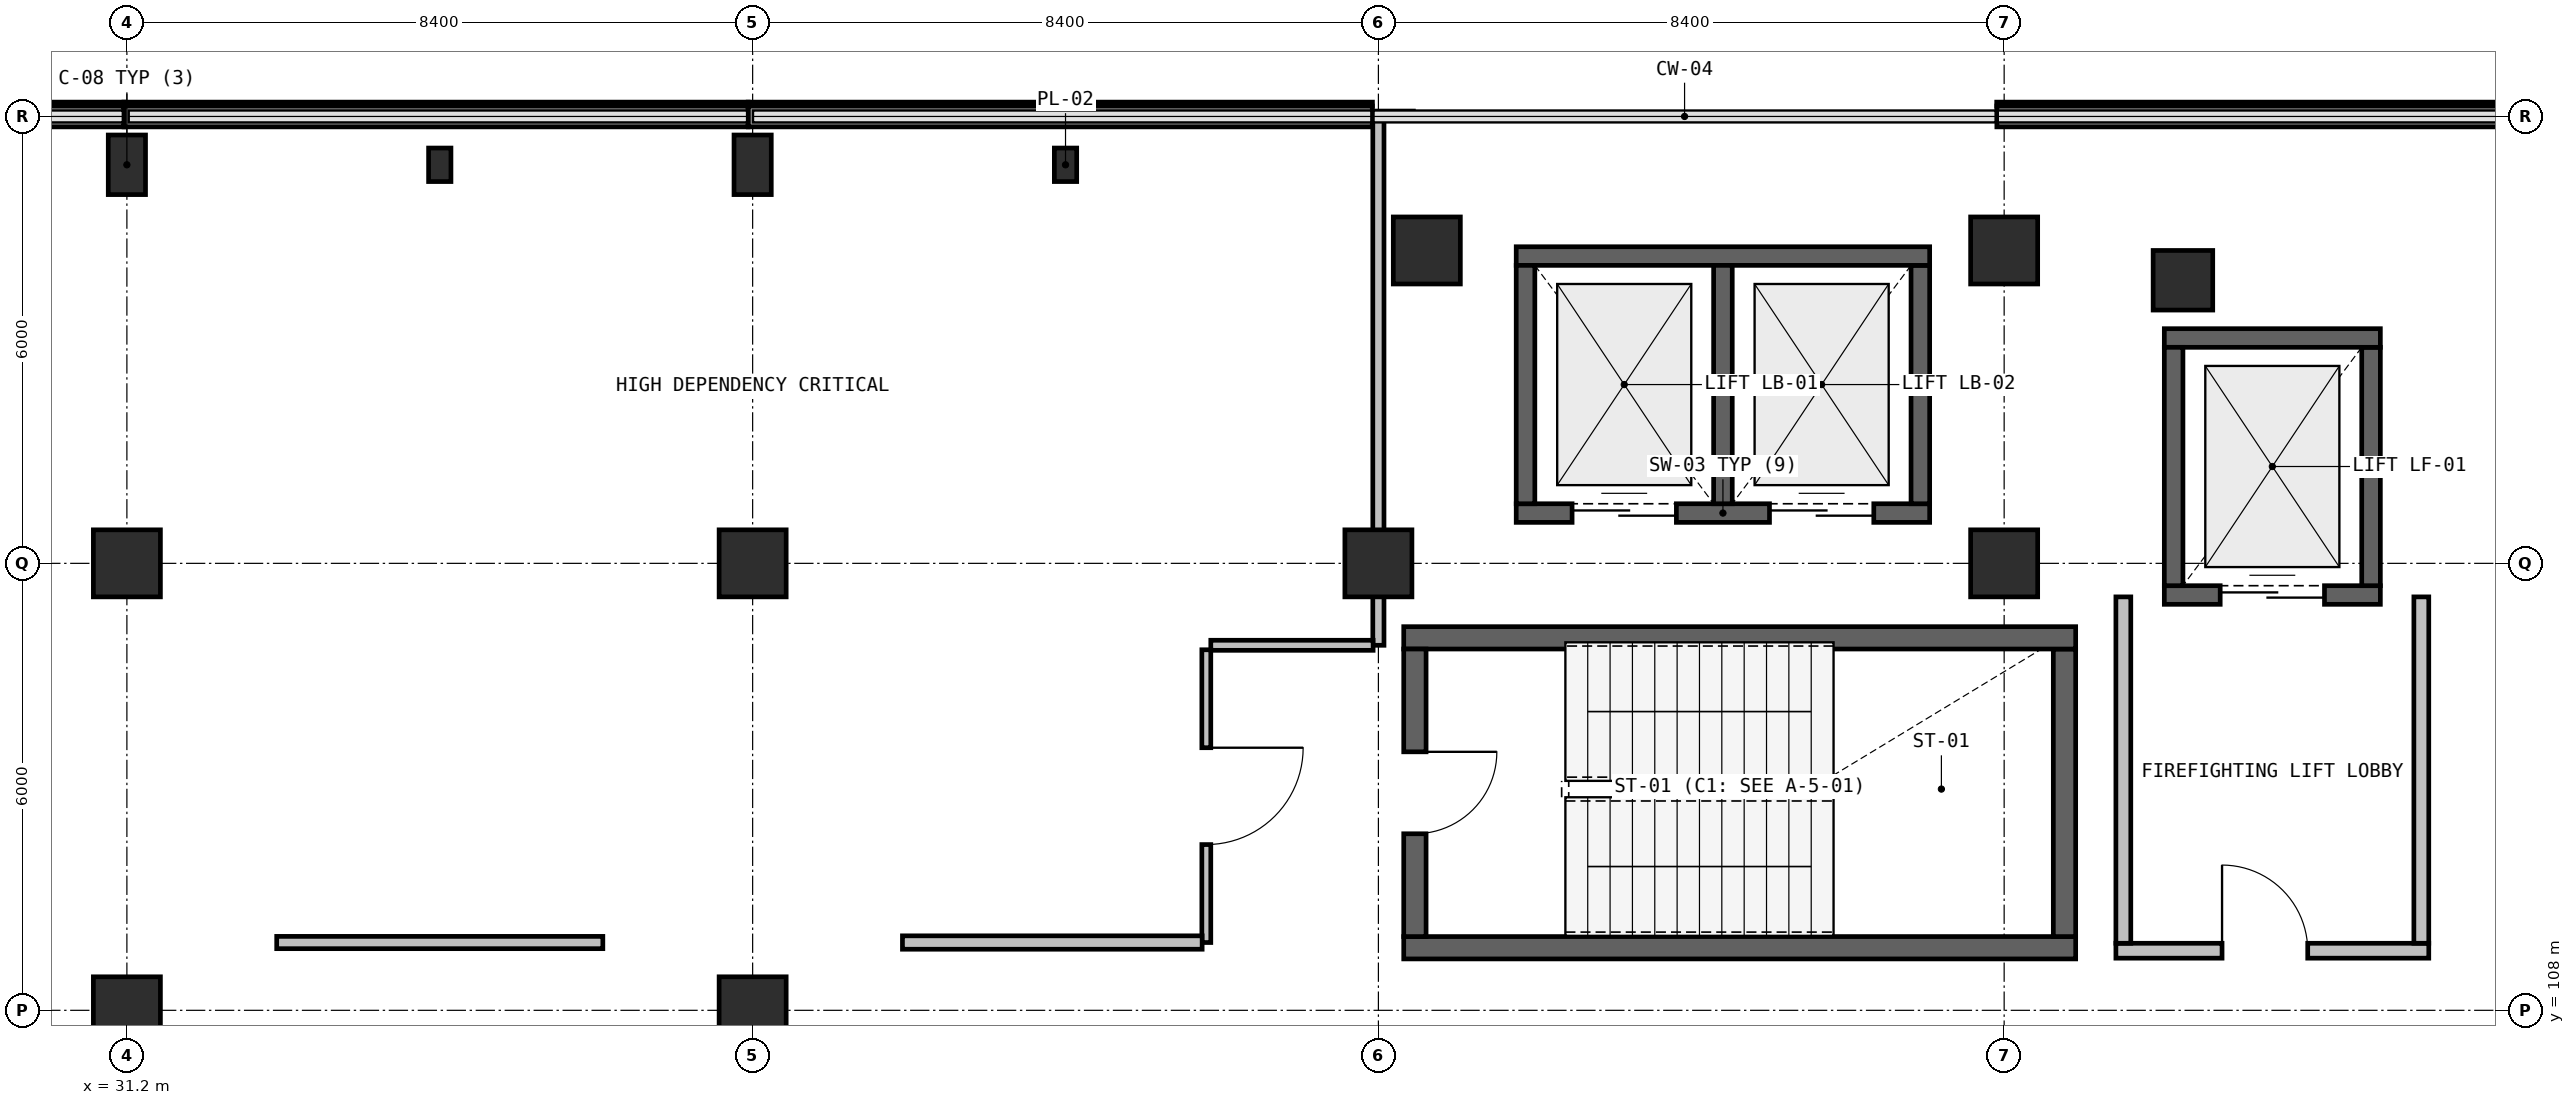
"""IFC4 building model, lengths in metres.
Left out: names, types, materials, properties, quantities, classifications, styles, units other than length and angle.
Written with IfcOpenShell. Run it as: python <this file> out.ifc"""

import sys

from ifc_helpers import new_model, si_unit, direction, frame, frame_2d, origin, origin_2d, place, context, subcontext, project, spatial, rectangle, extrude, element, fill, save


model = new_model("IFC4")
c1 = context("Model", 3, precision=1e-05, world=origin(), true_north=direction((0.0, 1.0)))
c2 = subcontext(c1, "Body", "Model", "MODEL_VIEW")
j1 = project(units=[si_unit("LENGTHUNIT", "METRE"), si_unit("PLANEANGLEUNIT", "RADIAN")], contexts=[c1])
p1 = place(None, origin())
s1 = spatial("IfcSite", under=j1, at=p1, CompositionType="ELEMENT")
p2 = place(p1, origin())
s2 = spatial("IfcBuilding", under=s1, at=p2, CompositionType="ELEMENT")
p3 = place(p2, frame((0.0, 0.0, 5.4)))
s3 = spatial("IfcBuildingStorey", under=s2, at=p3, CompositionType="ELEMENT", Elevation=5.4)
p4 = place(p3, frame((58.8, 117.8, 0.0), z_axis=(0.0, 0.0, 1.0), x_axis=(1.0, 0.0, 0.0)))
e1 = element("IfcColumn", 1, at=p4, inside=s3, PredefinedType="COLUMN", context=c2, shape_type="SweptSolid", body=[
    extrude(rectangle(XDim=0.8, YDim=0.8, at=origin_2d()), origin(), (0.0, 0.0, 1.0), 4.8),
])
for number, where, z_axis, x_axis in (
    (2, (48.65, 118.2, 0.0), (0.0, 0.0, 1.0), (1.0, 0.0, 0.0)),
    (3, (56.4, 118.2, 0.0), (0.0, 0.0, 1.0), (1.0, 0.0, 0.0)),
    (4, (31.2, 108.0, 0.0), (0.0, 0.0, 1.0), (1.0, 0.0, 0.0)),
    (5, (31.2, 114.0, 0.0), (0.0, 0.0, 1.0), (1.0, 0.0, 0.0)),
):
    element("IfcColumn", number, at=place(p3, frame(where, z_axis=z_axis, x_axis=x_axis)), inside=s3, PredefinedType="COLUMN", context=c2, shape_type="SweptSolid", body=[
        extrude(rectangle(XDim=0.9, YDim=0.9, at=origin_2d()), origin(), (0.0, 0.0, 1.0), 4.8),
    ])
p5 = place(p3, frame((31.2, 119.35, 0.0), z_axis=(0.0, 0.0, 1.0), x_axis=(1.0, 0.0, 0.0)))
e6 = element("IfcColumn", 6, at=p5, inside=s3, PredefinedType="COLUMN", context=c2, shape_type="SweptSolid", body=[
    extrude(rectangle(XDim=0.5, YDim=0.8, at=origin_2d()), origin(), (0.0, 0.0, 1.0), 4.8),
])
for number, where, z_axis, x_axis in (
    (7, (39.6, 108.0, 0.0), (0.0, 0.0, 1.0), (1.0, 0.0, 0.0)),
    (8, (39.6, 114.0, 0.0), (0.0, 0.0, 1.0), (1.0, 0.0, 0.0)),
):
    element("IfcColumn", number, at=place(p3, frame(where, z_axis=z_axis, x_axis=x_axis)), inside=s3, PredefinedType="COLUMN", context=c2, shape_type="SweptSolid", body=[
        extrude(rectangle(XDim=0.9, YDim=0.9, at=origin_2d()), origin(), (0.0, 0.0, 1.0), 4.8),
    ])
p6 = place(p3, frame((39.6, 119.35, 0.0), z_axis=(0.0, 0.0, 1.0), x_axis=(1.0, 0.0, 0.0)))
e9 = element("IfcColumn", 9, at=p6, inside=s3, PredefinedType="COLUMN", context=c2, shape_type="SweptSolid", body=[
    extrude(rectangle(XDim=0.5, YDim=0.8, at=origin_2d()), origin(), (0.0, 0.0, 1.0), 4.8),
])
for number, where, z_axis, x_axis in (
    (10, (48.0, 114.0, 0.0), (0.0, 0.0, 1.0), (1.0, 0.0, 0.0)),
    (11, (56.4, 114.0, 0.0), (0.0, 0.0, 1.0), (1.0, 0.0, 0.0)),
):
    element("IfcColumn", number, at=place(p3, frame(where, z_axis=z_axis, x_axis=x_axis)), inside=s3, PredefinedType="COLUMN", context=c2, shape_type="SweptSolid", body=[
        extrude(rectangle(XDim=0.9, YDim=0.9, at=origin_2d()), origin(), (0.0, 0.0, 1.0), 4.8),
    ])
for number, where, z_axis, x_axis in (
    (12, (35.4, 119.35, 0.0), (0.0, 0.0, 1.0), (1.0, 0.0, 0.0)),
    (13, (43.8, 119.35, 0.0), (0.0, 0.0, 1.0), (1.0, 0.0, 0.0)),
):
    element("IfcColumn", number, at=place(p3, frame(where, z_axis=z_axis, x_axis=x_axis)), inside=s3, PredefinedType="PILASTER", context=c2, shape_type="SweptSolid", body=[
        extrude(rectangle(XDim=0.3, YDim=0.45, at=origin_2d()), origin(), (0.0, 0.0, 1.0), 4.445),
    ])
for number, where, z_axis, x_axis in (
    (14, (22.782, 119.999, 0.0), (0.0, 0.0, 1.0), (1.0, 0.0, 0.0)),
    (15, (31.162, 119.999, 0.0), (0.0, 0.0, 1.0), (1.0, 0.0, 0.0)),
    (16, (39.542, 119.999, 0.0), (0.0, 0.0, 1.0), (1.0, 0.0, 0.0)),
    (17, (56.302, 119.999, 0.0), (0.0, 0.0, 1.0), (1.0, 0.0, 0.0)),
):
    element("IfcWall", number, at=place(p3, frame(where, z_axis=z_axis, x_axis=x_axis)), inside=s3, PredefinedType="SOLIDWALL", context=c2, shape_type="SweptSolid", body=[
        extrude(rectangle(XDim=8.376, YDim=0.28, at=frame_2d((4.188, 0.0))), origin(), (0.0, 0.0, 1.0), 0.94),
    ])
p7 = place(p3, frame((48.34, 108.84, 0.0), z_axis=(0.0, 0.0, 1.0), x_axis=(1.0, 0.0, 0.0)))
e18 = element("IfcWall", 18, at=p7, inside=s3, PredefinedType="SHEAR", context=c2, shape_type="SweptSolid", body=[
    extrude(rectangle(XDim=9.02, YDim=0.3, at=frame_2d((4.51, 0.0))), origin(), (0.0, 0.0, 1.0), 4.445),
])
p8 = place(p3, frame((57.21, 108.99, 0.0), z_axis=(0.0, 0.0, 1.0), x_axis=(0.0, 1.0, 0.0)))
e19 = element("IfcWall", 19, at=p8, inside=s3, PredefinedType="SHEAR", context=c2, shape_type="SweptSolid", body=[
    extrude(rectangle(XDim=3.86, YDim=0.3, at=frame_2d((1.93, 0.0))), origin(), (0.0, 0.0, 1.0), 4.445),
])
p9 = place(p3, frame((57.36, 113.0, 0.0), z_axis=(0.0, 0.0, 1.0), x_axis=(-1.0, 0.0, 0.0)))
e20 = element("IfcWall", 20, at=p9, inside=s3, PredefinedType="SHEAR", context=c2, shape_type="SweptSolid", body=[
    extrude(rectangle(XDim=9.02, YDim=0.3, at=frame_2d((4.51, 0.0))), origin(), (0.0, 0.0, 1.0), 4.445),
])
p10 = place(p3, frame((48.49, 112.85, 0.0), z_axis=(0.0, 0.0, 1.0), x_axis=(0.0, -1.0, 0.0)))
e21 = element("IfcWall", 21, at=p10, inside=s3, PredefinedType="SHEAR", context=c2, shape_type="SweptSolid", body=[
    extrude(rectangle(XDim=3.86, YDim=0.3, at=frame_2d((1.93, 0.0))), origin(), (0.0, 0.0, 1.0), 4.445),
])
p11 = place(p10, frame((1.38, 0.0, 0.0)))
e22 = element("IfcOpeningElement", 22, at=p11, cuts=e21, PredefinedType="OPENING", context=c2, shape_type="SweptSolid", body=[
    extrude(rectangle(XDim=1.1, YDim=2.15, at=frame_2d((0.55, 1.075))), frame((0.0, 0.16, 0.0), z_axis=(0.0, -1.0, 0.0), x_axis=(1.0, 0.0, 0.0)), (0.0, 0.0, 1.0), 0.32),
])
p12 = place(p3, frame((57.9, 108.8, 0.0), z_axis=(0.0, 0.0, 1.0), x_axis=(1.0, 0.0, 0.0)))
e23 = element("IfcWall", 23, at=p12, inside=s3, PredefinedType="SOLIDWALL", context=c2, shape_type="SweptSolid", body=[
    extrude(rectangle(XDim=4.2, YDim=0.2, at=frame_2d((2.1, 0.0))), origin(), (0.0, 0.0, 1.0), 4.445),
])
p13 = place(p12, frame((1.425, 0.0, 0.0)))
e24 = element("IfcOpeningElement", 24, at=p13, cuts=e23, PredefinedType="OPENING", context=c2, shape_type="SweptSolid", body=[
    extrude(rectangle(XDim=1.15, YDim=2.15, at=frame_2d((0.575, 1.075))), frame((0.0, 0.11, 0.0), z_axis=(0.0, -1.0, 0.0), x_axis=(1.0, 0.0, 0.0)), (0.0, 0.0, 1.0), 0.22),
])
for number, where, z_axis, x_axis in (
    (25, (62.0, 108.9, 0.0), (0.0, 0.0, 1.0), (0.0, 1.0, 0.0)),
    (26, (58.0, 113.55, 0.0), (0.0, 0.0, 1.0), (0.0, -1.0, 0.0)),
):
    element("IfcWall", number, at=place(p3, frame(where, z_axis=z_axis, x_axis=x_axis)), inside=s3, PredefinedType="SOLIDWALL", context=c2, shape_type="SweptSolid", body=[
        extrude(rectangle(XDim=4.65, YDim=0.2, at=frame_2d((2.325, 0.0))), origin(), (0.0, 0.0, 1.0), 4.445),
    ])
p14 = place(p3, frame((58.55, 113.575, 0.0), z_axis=(0.0, 0.0, 1.0), x_axis=(1.0, 0.0, 0.0)))
e27 = element("IfcWall", 27, at=p14, inside=s3, PredefinedType="SHEAR", context=c2, shape_type="SweptSolid", body=[
    extrude(rectangle(XDim=2.9, YDim=0.25, at=frame_2d((1.45, 0.0))), origin(), (0.0, 0.0, 1.0), 4.445),
])
p15 = place(p14, frame((0.75, 0.0, 0.0)))
e28 = element("IfcOpeningElement", 28, at=p15, cuts=e27, PredefinedType="OPENING", context=c2, shape_type="SweptSolid", body=[
    extrude(rectangle(XDim=1.4, YDim=2.15, at=frame_2d((0.7, 1.075))), frame((0.0, 0.135, 0.0), z_axis=(0.0, -1.0, 0.0), x_axis=(1.0, 0.0, 0.0)), (0.0, 0.0, 1.0), 0.27),
])
p16 = place(p3, frame((61.325, 113.7, 0.0), z_axis=(0.0, 0.0, 1.0), x_axis=(0.0, 1.0, 0.0)))
e29 = element("IfcWall", 29, at=p16, inside=s3, PredefinedType="SHEAR", context=c2, shape_type="SweptSolid", body=[
    extrude(rectangle(XDim=3.2, YDim=0.25, at=frame_2d((1.6, 0.0))), origin(), (0.0, 0.0, 1.0), 4.445),
])
p17 = place(p3, frame((61.45, 117.025, 0.0), z_axis=(0.0, 0.0, 1.0), x_axis=(-1.0, 0.0, 0.0)))
e30 = element("IfcWall", 30, at=p17, inside=s3, PredefinedType="SHEAR", context=c2, shape_type="SweptSolid", body=[
    extrude(rectangle(XDim=2.9, YDim=0.25, at=frame_2d((1.45, 0.0))), origin(), (0.0, 0.0, 1.0), 4.445),
])
p18 = place(p3, frame((58.675, 116.9, 0.0), z_axis=(0.0, 0.0, 1.0), x_axis=(0.0, -1.0, 0.0)))
e31 = element("IfcWall", 31, at=p18, inside=s3, PredefinedType="SHEAR", context=c2, shape_type="SweptSolid", body=[
    extrude(rectangle(XDim=3.2, YDim=0.25, at=frame_2d((1.6, 0.0))), origin(), (0.0, 0.0, 1.0), 4.445),
])
p19 = place(p3, frame((49.85, 114.675, 0.0), z_axis=(0.0, 0.0, 1.0), x_axis=(1.0, 0.0, 0.0)))
e32 = element("IfcWall", 32, at=p19, inside=s3, PredefinedType="SHEAR", context=c2, shape_type="SweptSolid", body=[
    extrude(rectangle(XDim=5.55, YDim=0.25, at=frame_2d((2.775, 0.0))), origin(), (0.0, 0.0, 1.0), 4.445),
])
p20 = place(p19, frame((0.75, 0.0, 0.0)))
e33 = element("IfcOpeningElement", 33, at=p20, cuts=e32, PredefinedType="OPENING", context=c2, shape_type="SweptSolid", body=[
    extrude(rectangle(XDim=1.4, YDim=2.2, at=frame_2d((0.7, 1.1))), frame((0.0, 0.135, 0.0), z_axis=(0.0, -1.0, 0.0), x_axis=(1.0, 0.0, 0.0)), (0.0, 0.0, 1.0), 0.27),
])
p21 = place(p19, frame((3.4, 0.0, 0.0)))
e34 = element("IfcOpeningElement", 34, at=p21, cuts=e32, PredefinedType="OPENING", context=c2, shape_type="SweptSolid", body=[
    extrude(rectangle(XDim=1.4, YDim=2.2, at=frame_2d((0.7, 1.1))), frame((0.0, 0.135, 0.0), z_axis=(0.0, -1.0, 0.0), x_axis=(1.0, 0.0, 0.0)), (0.0, 0.0, 1.0), 0.27),
])
p22 = place(p3, frame((55.275, 114.8, 0.0), z_axis=(0.0, 0.0, 1.0), x_axis=(0.0, 1.0, 0.0)))
e35 = element("IfcWall", 35, at=p22, inside=s3, PredefinedType="SHEAR", context=c2, shape_type="SweptSolid", body=[
    extrude(rectangle(XDim=3.2, YDim=0.25, at=frame_2d((1.6, 0.0))), origin(), (0.0, 0.0, 1.0), 4.445),
])
p23 = place(p3, frame((55.4, 118.125, 0.0), z_axis=(0.0, 0.0, 1.0), x_axis=(-1.0, 0.0, 0.0)))
e36 = element("IfcWall", 36, at=p23, inside=s3, PredefinedType="SHEAR", context=c2, shape_type="SweptSolid", body=[
    extrude(rectangle(XDim=5.55, YDim=0.25, at=frame_2d((2.775, 0.0))), origin(), (0.0, 0.0, 1.0), 4.445),
])
for number, where, z_axis, x_axis in (
    (37, (49.975, 118.0, 0.0), (0.0, 0.0, 1.0), (0.0, -1.0, 0.0)),
    (38, (52.625, 114.8, 0.0), (0.0, 0.0, 1.0), (0.0, 1.0, 0.0)),
):
    element("IfcWall", number, at=place(p3, frame(where, z_axis=z_axis, x_axis=x_axis)), inside=s3, PredefinedType="SHEAR", context=c2, shape_type="SweptSolid", body=[
        extrude(rectangle(XDim=3.2, YDim=0.25, at=frame_2d((1.6, 0.0))), origin(), (0.0, 0.0, 1.0), 4.445),
    ])
p24 = place(p3, frame((48.0, 119.988, 0.0), z_axis=(0.0, 0.0, 1.0), x_axis=(0.0, -1.0, 0.0)))
e39 = element("IfcWall", 39, at=p24, inside=s3, PredefinedType="PARTITIONING", context=c2, shape_type="SweptSolid", body=[
    extrude(rectangle(XDim=7.088, YDim=0.15, at=frame_2d((3.544, 0.0))), origin(), (0.0, 0.0, 1.0), 3.695),
])
p25 = place(p3, frame((47.929, 112.9, 0.0), z_axis=(0.0, 0.0, 1.0), x_axis=(-1.0, 0.0, 0.0)))
e40 = element("IfcWall", 40, at=p25, inside=s3, PredefinedType="PARTITIONING", context=c2, shape_type="SweptSolid", body=[
    extrude(rectangle(XDim=2.179, YDim=0.135, at=frame_2d((1.089, 0.0))), origin(), (0.0, 0.0, 1.0), 4.445),
])
p26 = place(p3, frame((45.69, 112.84, 0.0), z_axis=(0.0, 0.0, 1.0), x_axis=(0.0, -1.0, 0.0)))
e41 = element("IfcWall", 41, at=p26, inside=s3, PredefinedType="PARTITIONING", context=c2, shape_type="SweptSolid", body=[
    extrude(rectangle(XDim=3.93, YDim=0.12, at=frame_2d((1.965, 0.0))), origin(), (0.0, 0.0, 1.0), 4.445),
])
p27 = place(p26, frame((1.315, 0.0, 0.0)))
e42 = element("IfcOpeningElement", 42, at=p27, cuts=e41, PredefinedType="OPENING", context=c2, shape_type="SweptSolid", body=[
    extrude(rectangle(XDim=1.3, YDim=2.15, at=frame_2d((0.65, 1.075))), frame((0.0, 0.07, 0.0), z_axis=(0.0, -1.0, 0.0), x_axis=(1.0, 0.0, 0.0)), (0.0, 0.0, 1.0), 0.14),
])
p28 = place(p3, frame((45.634, 108.91, 0.0), z_axis=(0.0, 0.0, 1.0), x_axis=(-1.0, 0.0, 0.0)))
e43 = element("IfcWall", 43, at=p28, inside=s3, PredefinedType="PARTITIONING", context=c2, shape_type="SweptSolid", body=[
    extrude(rectangle(XDim=4.023, YDim=0.18, at=frame_2d((2.011, 0.0))), origin(), (0.0, 0.0, 1.0), 4.445),
])
p29 = place(p3, frame((37.589, 108.91, 0.0), z_axis=(0.0, 0.0, 1.0), x_axis=(-1.0, 0.0, 0.0)))
e44 = element("IfcWall", 44, at=p29, inside=s3, PredefinedType="PARTITIONING", context=c2, shape_type="SweptSolid", body=[
    extrude(rectangle(XDim=4.378, YDim=0.165, at=frame_2d((2.189, 0.0))), origin(), (0.0, 0.0, 1.0), 4.445),
])
p30 = place(p11, origin())
e45 = element("IfcDoor", 45, at=p30, inside=s3, OperationType="SINGLE_SWING_LEFT", PredefinedType="DOOR", context=c2, shape_type="SweptSolid", body=[
    extrude(rectangle(XDim=1.1, YDim=2.15, at=frame_2d((0.55, 1.075))), frame((0.0, 0.025, 0.0), z_axis=(0.0, -1.0, 0.0), x_axis=(1.0, 0.0, 0.0)), (0.0, 0.0, 1.0), 0.05),
])
fill(e22, e45)
p31 = place(p13, origin())
e46 = element("IfcDoor", 46, at=p31, inside=s3, OperationType="SINGLE_SWING_RIGHT", PredefinedType="DOOR", context=c2, shape_type="SweptSolid", body=[
    extrude(rectangle(XDim=1.15, YDim=2.15, at=frame_2d((0.575, 1.075))), frame((0.0, 0.025, 0.0), z_axis=(0.0, -1.0, 0.0), x_axis=(1.0, 0.0, 0.0)), (0.0, 0.0, 1.0), 0.05),
])
fill(e24, e46)
p32 = place(p15, origin())
e47 = element("IfcDoor", 47, at=p32, inside=s3, OperationType="DOUBLE_DOOR_SLIDING", PredefinedType="DOOR", context=c2, shape_type="SweptSolid", body=[
    extrude(rectangle(XDim=1.4, YDim=2.15, at=frame_2d((0.7, 1.075))), frame((0.0, 0.025, 0.0), z_axis=(0.0, -1.0, 0.0), x_axis=(1.0, 0.0, 0.0)), (0.0, 0.0, 1.0), 0.05),
])
fill(e28, e47)
p33 = place(p20, origin())
e48 = element("IfcDoor", 48, at=p33, inside=s3, OperationType="DOUBLE_DOOR_SLIDING", PredefinedType="DOOR", context=c2, shape_type="SweptSolid", body=[
    extrude(rectangle(XDim=1.4, YDim=2.2, at=frame_2d((0.7, 1.1))), frame((0.0, 0.025, 0.0), z_axis=(0.0, -1.0, 0.0), x_axis=(1.0, 0.0, 0.0)), (0.0, 0.0, 1.0), 0.05),
])
fill(e33, e48)
p34 = place(p21, origin())
e49 = element("IfcDoor", 49, at=p34, inside=s3, OperationType="DOUBLE_DOOR_SLIDING", PredefinedType="DOOR", context=c2, shape_type="SweptSolid", body=[
    extrude(rectangle(XDim=1.4, YDim=2.2, at=frame_2d((0.7, 1.1))), frame((0.0, 0.025, 0.0), z_axis=(0.0, -1.0, 0.0), x_axis=(1.0, 0.0, 0.0)), (0.0, 0.0, 1.0), 0.05),
])
fill(e34, e49)
p35 = place(p27, origin())
e50 = element("IfcDoor", 50, at=p35, inside=s3, OperationType="SINGLE_SWING_LEFT", PredefinedType="DOOR", context=c2, shape_type="SweptSolid", body=[
    extrude(rectangle(XDim=1.3, YDim=2.15, at=frame_2d((0.65, 1.075))), frame((0.0, 0.025, 0.0), z_axis=(0.0, -1.0, 0.0), x_axis=(1.0, 0.0, 0.0)), (0.0, 0.0, 1.0), 0.05),
])
fill(e42, e50)
save(model, sys.argv[1])
